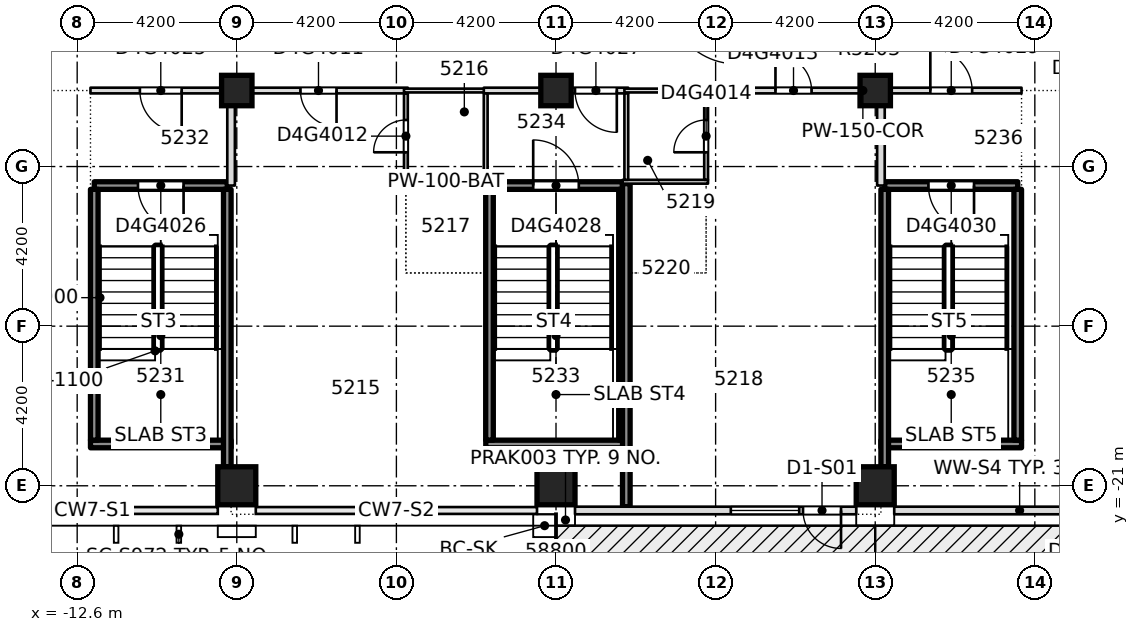
"""IFC4 building model, lengths in metres.
Left out: names, types, materials, properties, quantities, classifications, styles, units other than length and angle.
Written with IfcOpenShell. Run it as: python <this file> out.ifc"""

import sys

from ifc_helpers import new_model, si_unit, direction, frame, frame_2d, origin, origin_2d, place, context, subcontext, project, spatial, rectangle, extrude, element, fill, save


model = new_model("IFC4")
c1 = context("Model", 3, precision=1e-05, world=origin(), true_north=direction((0.0, 1.0)))
c2 = subcontext(c1, "Body", "Model", "MODEL_VIEW")
j1 = project(units=[si_unit("LENGTHUNIT", "METRE"), si_unit("PLANEANGLEUNIT", "RADIAN")], contexts=[c1])
p1 = place(None, origin())
s1 = spatial("IfcSite", under=j1, at=p1, CompositionType="ELEMENT")
p2 = place(p1, origin())
s2 = spatial("IfcBuilding", under=s1, at=p2, CompositionType="ELEMENT")
p3 = place(p2, frame((0.0, 0.0, 199.7)))
s3 = spatial("IfcBuildingStorey", under=s2, at=p3, CompositionType="ELEMENT", Elevation=199.7)
for number, where, z_axis, x_axis in (
    (1, (-8.4, -21.0, -0.4), (0.0, 0.0, 1.0), (1.0, 0.0, 0.0)),
    (2, (0.0, -21.0, -0.4), (0.0, 0.0, 1.0), (1.0, 0.0, 0.0)),
    (3, (8.4, -21.0, -0.4), (0.0, 0.0, 1.0), (1.0, 0.0, 0.0)),
):
    element("IfcColumn", number, at=place(p3, frame(where, z_axis=z_axis, x_axis=x_axis)), inside=s3, PredefinedType="COLUMN", context=c2, shape_type="SweptSolid", body=[
        extrude(rectangle(XDim=1.0, YDim=1.0, at=origin_2d()), origin(), (0.0, 0.0, 1.0), 3.45),
    ])
for number, where, z_axis, x_axis in (
    (4, (-8.4, -10.6, -0.4), (0.0, 0.0, 1.0), (1.0, 0.0, 0.0)),
    (5, (0.0, -10.6, -0.4), (0.0, 0.0, 1.0), (1.0, 0.0, 0.0)),
    (6, (8.4, -10.6, -0.4), (0.0, 0.0, 1.0), (1.0, 0.0, 0.0)),
):
    element("IfcColumn", number, at=place(p3, frame(where, z_axis=z_axis, x_axis=x_axis)), inside=s3, PredefinedType="COLUMN", context=c2, shape_type="SweptSolid", body=[
        extrude(rectangle(XDim=0.8, YDim=0.8, at=origin_2d()), origin(), (0.0, 0.0, 1.0), 3.45),
    ])
p4 = place(p3, frame((-1.848, -19.9, 0.0), z_axis=(0.0, 0.0, 1.0), x_axis=(1.0, 0.0, 0.0)))
e7 = element("IfcWall", 7, at=p4, inside=s3, PredefinedType="SOLIDWALL", context=c2, shape_type="SweptSolid", body=[
    extrude(rectangle(XDim=3.696, YDim=0.2, at=frame_2d((1.848, 0.0))), origin(), (0.0, 0.0, 1.0), 3.05),
])
p5 = place(p3, frame((-12.15, -13.1, 0.0), z_axis=(0.0, 0.0, 1.0), x_axis=(1.0, 0.0, 0.0)))
e8 = element("IfcWall", 8, at=p5, inside=s3, PredefinedType="SOLIDWALL", context=c2, shape_type="SweptSolid", body=[
    extrude(rectangle(XDim=3.5, YDim=0.2, at=frame_2d((1.75, 0.0))), origin(), (0.0, 0.0, 1.0), 3.05),
])
p6 = place(p5, frame((1.15, 0.0, 0.0)))
e9 = element("IfcOpeningElement", 9, at=p6, cuts=e8, PredefinedType="OPENING", context=c2, shape_type="SweptSolid", body=[
    extrude(rectangle(XDim=1.2, YDim=2.1, at=frame_2d((0.6, 1.05))), frame((0.0, 0.11, 0.0), z_axis=(0.0, -1.0, 0.0), x_axis=(1.0, 0.0, 0.0)), (0.0, 0.0, 1.0), 0.22),
])
p7 = place(p3, frame((-1.848, -13.1, 0.0), z_axis=(0.0, 0.0, 1.0), x_axis=(1.0, 0.0, 0.0)))
e10 = element("IfcWall", 10, at=p7, inside=s3, PredefinedType="SOLIDWALL", context=c2, shape_type="SweptSolid", body=[
    extrude(rectangle(XDim=3.596, YDim=0.2, at=frame_2d((1.798, 0.0))), origin(), (0.0, 0.0, 1.0), 3.05),
])
p8 = place(p7, frame((1.248, 0.0, 0.0)))
e11 = element("IfcOpeningElement", 11, at=p8, cuts=e10, PredefinedType="OPENING", context=c2, shape_type="SweptSolid", body=[
    extrude(rectangle(XDim=1.2, YDim=2.1, at=frame_2d((0.6, 1.05))), frame((0.0, 0.11, 0.0), z_axis=(0.0, -1.0, 0.0), x_axis=(1.0, 0.0, 0.0)), (0.0, 0.0, 1.0), 0.22),
])
p9 = place(p3, frame((8.65, -13.1, 0.0), z_axis=(0.0, 0.0, 1.0), x_axis=(1.0, 0.0, 0.0)))
e12 = element("IfcWall", 12, at=p9, inside=s3, PredefinedType="SOLIDWALL", context=c2, shape_type="SweptSolid", body=[
    extrude(rectangle(XDim=3.5, YDim=0.2, at=frame_2d((1.75, 0.0))), origin(), (0.0, 0.0, 1.0), 3.05),
])
p10 = place(p9, frame((1.15, 0.0, 0.0)))
e13 = element("IfcOpeningElement", 13, at=p10, cuts=e12, PredefinedType="OPENING", context=c2, shape_type="SweptSolid", body=[
    extrude(rectangle(XDim=1.2, YDim=2.1, at=frame_2d((0.6, 1.05))), frame((0.0, 0.11, 0.0), z_axis=(0.0, -1.0, 0.0), x_axis=(1.0, 0.0, 0.0)), (0.0, 0.0, 1.0), 0.22),
])
p11 = place(p3, frame((-4.0, -13.0, 0.0), z_axis=(0.0, 0.0, 1.0), x_axis=(1.0, 0.0, 0.0)))
e14 = element("IfcWall", 14, at=p11, inside=s3, PredefinedType="PARTITIONING", context=c2, shape_type="SweptSolid", body=[
    extrude(rectangle(XDim=2.2, YDim=0.1, at=frame_2d((1.1, 0.0))), origin(), (0.0, 0.0, 1.0), 3.05),
])
p12 = place(p3, frame((1.75, -13.0, 0.0), z_axis=(0.0, 0.0, 1.0), x_axis=(1.0, 0.0, 0.0)))
e15 = element("IfcWall", 15, at=p12, inside=s3, PredefinedType="PARTITIONING", context=c2, shape_type="SweptSolid", body=[
    extrude(rectangle(XDim=2.25, YDim=0.1, at=frame_2d((1.125, 0.0))), origin(), (0.0, 0.0, 1.0), 3.05),
])
p13 = place(p3, frame((-12.25, -10.6, 0.0), z_axis=(0.0, 0.0, 1.0), x_axis=(1.0, 0.0, 0.0)))
e16 = element("IfcWall", 16, at=p13, inside=s3, PredefinedType="PARTITIONING", context=c2, shape_type="SweptSolid", body=[
    extrude(rectangle(XDim=8.35, YDim=0.15, at=frame_2d((4.175, 0.0))), origin(), (0.0, 0.0, 1.0), 3.05),
])
p14 = place(p13, frame((5.525, 0.0, 0.0)))
e17 = element("IfcOpeningElement", 17, at=p14, cuts=e16, PredefinedType="OPENING", context=c2, shape_type="SweptSolid", body=[
    extrude(rectangle(XDim=0.95, YDim=2.1, at=frame_2d((0.475, 1.05))), frame((0.0, 0.085, 0.0), z_axis=(0.0, -1.0, 0.0), x_axis=(1.0, 0.0, 0.0)), (0.0, 0.0, 1.0), 0.17),
])
p15 = place(p13, frame((1.3, 0.0, 0.0)))
e18 = element("IfcOpeningElement", 18, at=p15, cuts=e16, PredefinedType="OPENING", context=c2, shape_type="SweptSolid", body=[
    extrude(rectangle(XDim=1.1, YDim=2.1, at=frame_2d((0.55, 1.05))), frame((0.0, 0.085, 0.0), z_axis=(0.0, -1.0, 0.0), x_axis=(1.0, 0.0, 0.0)), (0.0, 0.0, 1.0), 0.17),
])
p16 = place(p3, frame((-4.0, -10.6, 0.0), z_axis=(0.0, 0.0, 1.0), x_axis=(1.0, 0.0, 0.0)))
e19 = element("IfcWall", 19, at=p16, inside=s3, PredefinedType="PARTITIONING", context=c2, shape_type="SweptSolid", body=[
    extrude(rectangle(XDim=2.2, YDim=0.1, at=frame_2d((1.1, 0.0))), origin(), (0.0, 0.0, 1.0), 3.05),
])
p17 = place(p3, frame((-1.9, -10.6, 0.0), z_axis=(0.0, 0.0, 1.0), x_axis=(1.0, 0.0, 0.0)))
e20 = element("IfcWall", 20, at=p17, inside=s3, PredefinedType="PARTITIONING", context=c2, shape_type="SweptSolid", body=[
    extrude(rectangle(XDim=3.8, YDim=0.15, at=frame_2d((1.9, 0.0))), origin(), (0.0, 0.0, 1.0), 3.05),
])
p18 = place(p17, frame((2.4, 0.0, 0.0)))
e21 = element("IfcOpeningElement", 21, at=p18, cuts=e20, PredefinedType="OPENING", context=c2, shape_type="SweptSolid", body=[
    extrude(rectangle(XDim=1.1, YDim=2.1, at=frame_2d((0.55, 1.05))), frame((0.0, 0.085, 0.0), z_axis=(0.0, -1.0, 0.0), x_axis=(1.0, 0.0, 0.0)), (0.0, 0.0, 1.0), 0.17),
])
p19 = place(p3, frame((1.8, -10.6, 0.0), z_axis=(0.0, 0.0, 1.0), x_axis=(1.0, 0.0, 0.0)))
e22 = element("IfcWall", 22, at=p19, inside=s3, PredefinedType="PARTITIONING", context=c2, shape_type="SweptSolid", body=[
    extrude(rectangle(XDim=2.2, YDim=0.1, at=frame_2d((1.1, 0.0))), origin(), (0.0, 0.0, 1.0), 3.05),
])
p20 = place(p3, frame((3.9, -10.6, 0.0), z_axis=(0.0, 0.0, 1.0), x_axis=(1.0, 0.0, 0.0)))
e23 = element("IfcWall", 23, at=p20, inside=s3, PredefinedType="PARTITIONING", context=c2, shape_type="SweptSolid", body=[
    extrude(rectangle(XDim=8.35, YDim=0.15, at=frame_2d((4.175, 0.0))), origin(), (0.0, 0.0, 1.0), 3.05),
])
p21 = place(p20, frame((1.875, 0.0, 0.0)))
e24 = element("IfcOpeningElement", 24, at=p21, cuts=e23, PredefinedType="OPENING", context=c2, shape_type="SweptSolid", body=[
    extrude(rectangle(XDim=0.95, YDim=2.1, at=frame_2d((0.475, 1.05))), frame((0.0, 0.085, 0.0), z_axis=(0.0, -1.0, 0.0), x_axis=(1.0, 0.0, 0.0)), (0.0, 0.0, 1.0), 0.17),
])
p22 = place(p20, frame((5.95, 0.0, 0.0)))
e25 = element("IfcOpeningElement", 25, at=p22, cuts=e23, PredefinedType="OPENING", context=c2, shape_type="SweptSolid", body=[
    extrude(rectangle(XDim=1.1, YDim=2.1, at=frame_2d((0.55, 1.05))), frame((0.0, 0.085, 0.0), z_axis=(0.0, -1.0, 0.0), x_axis=(1.0, 0.0, 0.0)), (0.0, 0.0, 1.0), 0.17),
])
p23 = place(p3, frame((-8.55, -13.1, 0.0), z_axis=(0.0, 0.0, 1.0), x_axis=(0.0, 1.0, 0.0)))
e26 = element("IfcWall", 26, at=p23, inside=s3, PredefinedType="PARTITIONING", context=c2, shape_type="SweptSolid", body=[
    extrude(rectangle(XDim=2.425, YDim=0.2, at=frame_2d((1.212, 0.0))), origin(), (0.0, 0.0, 1.0), 3.05),
])
p24 = place(p3, frame((-3.95, -12.95, 0.0), z_axis=(0.0, 0.0, 1.0), x_axis=(0.0, 1.0, 0.0)))
e27 = element("IfcWall", 27, at=p24, inside=s3, PredefinedType="PARTITIONING", context=c2, shape_type="SweptSolid", body=[
    extrude(rectangle(XDim=2.275, YDim=0.1, at=frame_2d((1.137, 0.0))), origin(), (0.0, 0.0, 1.0), 3.05),
])
p25 = place(p24, frame((0.725, 0.0, 0.0)))
e28 = element("IfcOpeningElement", 28, at=p25, cuts=e27, PredefinedType="OPENING", context=c2, shape_type="SweptSolid", body=[
    extrude(rectangle(XDim=0.85, YDim=2.1, at=frame_2d((0.425, 1.05))), frame((0.0, 0.06, 0.0), z_axis=(0.0, -1.0, 0.0), x_axis=(1.0, 0.0, 0.0)), (0.0, 0.0, 1.0), 0.12),
])
p26 = place(p3, frame((-1.85, -12.95, 0.0), z_axis=(0.0, 0.0, 1.0), x_axis=(0.0, 1.0, 0.0)))
e29 = element("IfcWall", 29, at=p26, inside=s3, PredefinedType="PARTITIONING", context=c2, shape_type="SweptSolid", body=[
    extrude(rectangle(XDim=2.275, YDim=0.1, at=frame_2d((1.137, 0.0))), origin(), (0.0, 0.0, 1.0), 3.05),
])
for number, where, z_axis, x_axis in (
    (30, (-1.75, -19.798, 0.0), (0.0, 0.0, 1.0), (0.0, 1.0, 0.0)),
    (31, (1.75, -19.798, 0.0), (0.0, 0.0, 1.0), (0.0, 1.0, 0.0)),
):
    element("IfcWall", number, at=place(p3, frame(where, z_axis=z_axis, x_axis=x_axis)), inside=s3, PredefinedType="SOLIDWALL", context=c2, shape_type="SweptSolid", body=[
        extrude(rectangle(XDim=6.596, YDim=0.2, at=frame_2d((3.298, 0.0))), origin(), (0.0, 0.0, 1.0), 3.05),
    ])
p27 = place(p3, frame((1.85, -12.95, 0.0), z_axis=(0.0, 0.0, 1.0), x_axis=(0.0, 1.0, 0.0)))
e32 = element("IfcWall", 32, at=p27, inside=s3, PredefinedType="PARTITIONING", context=c2, shape_type="SweptSolid", body=[
    extrude(rectangle(XDim=2.275, YDim=0.1, at=frame_2d((1.137, 0.0))), origin(), (0.0, 0.0, 1.0), 3.05),
])
p28 = place(p3, frame((3.95, -12.95, 0.0), z_axis=(0.0, 0.0, 1.0), x_axis=(0.0, 1.0, 0.0)))
e33 = element("IfcWall", 33, at=p28, inside=s3, PredefinedType="PARTITIONING", context=c2, shape_type="SweptSolid", body=[
    extrude(rectangle(XDim=2.275, YDim=0.1, at=frame_2d((1.137, 0.0))), origin(), (0.0, 0.0, 1.0), 3.05),
])
p29 = place(p28, frame((0.725, 0.0, 0.0)))
e34 = element("IfcOpeningElement", 34, at=p29, cuts=e33, PredefinedType="OPENING", context=c2, shape_type="SweptSolid", body=[
    extrude(rectangle(XDim=0.85, YDim=2.1, at=frame_2d((0.425, 1.05))), frame((0.0, 0.06, 0.0), z_axis=(0.0, -1.0, 0.0), x_axis=(1.0, 0.0, 0.0)), (0.0, 0.0, 1.0), 0.12),
])
p30 = place(p3, frame((8.55, -13.1, 0.0), z_axis=(0.0, 0.0, 1.0), x_axis=(0.0, 1.0, 0.0)))
e35 = element("IfcWall", 35, at=p30, inside=s3, PredefinedType="PARTITIONING", context=c2, shape_type="SweptSolid", body=[
    extrude(rectangle(XDim=2.425, YDim=0.2, at=frame_2d((1.212, 0.0))), origin(), (0.0, 0.0, 1.0), 3.05),
])
p31 = place(p3, frame((0.5, -21.65, 0.0), z_axis=(0.0, 0.0, 1.0), x_axis=(1.0, 0.0, 0.0)))
e36 = element("IfcWall", 36, at=p31, inside=s3, PredefinedType="STANDARD", context=c2, shape_type="SweptSolid", body=[
    extrude(rectangle(XDim=7.4, YDim=0.2, at=frame_2d((3.7, 0.0))), origin(), (0.0, 0.0, 1.0), 3.05),
])
p32 = place(p31, frame((4.1, 0.0, 0.2)))
e37 = element("IfcOpeningElement", 37, at=p32, cuts=e36, PredefinedType="OPENING", context=c2, shape_type="SweptSolid", body=[
    extrude(rectangle(XDim=1.8, YDim=2.65, at=frame_2d((0.9, 1.325))), frame((0.0, 0.11, 0.0), z_axis=(0.0, -1.0, 0.0), x_axis=(1.0, 0.0, 0.0)), (0.0, 0.0, 1.0), 0.22),
])
p33 = place(p31, frame((6.0, 0.0, 0.0)))
e38 = element("IfcOpeningElement", 38, at=p33, cuts=e36, PredefinedType="OPENING", context=c2, shape_type="SweptSolid", body=[
    extrude(rectangle(XDim=1.0, YDim=2.4, at=frame_2d((0.5, 1.2))), frame((0.0, 0.11, 0.0), z_axis=(0.0, -1.0, 0.0), x_axis=(1.0, 0.0, 0.0)), (0.0, 0.0, 1.0), 0.22),
])
p34 = place(p3, frame((8.9, -21.65, 0.0), z_axis=(0.0, 0.0, 1.0), x_axis=(1.0, 0.0, 0.0)))
e39 = element("IfcWall", 39, at=p34, inside=s3, PredefinedType="STANDARD", context=c2, shape_type="SweptSolid", body=[
    extrude(rectangle(XDim=6.6, YDim=0.2, at=frame_2d((3.3, 0.0))), origin(), (0.0, 0.0, 1.0), 3.05),
])
p35 = place(p34, frame((4.65, 0.0, 0.0)))
e40 = element("IfcOpeningElement", 40, at=p35, cuts=e39, PredefinedType="OPENING", context=c2, shape_type="SweptSolid", body=[
    extrude(rectangle(XDim=1.0, YDim=2.4, at=frame_2d((0.5, 1.2))), frame((0.0, 0.11, 0.0), z_axis=(0.0, -1.0, 0.0), x_axis=(1.0, 0.0, 0.0)), (0.0, 0.0, 1.0), 0.22),
])
p36 = place(p3, frame((-12.25, -19.9, 0.0), z_axis=(0.0, 0.0, 1.0), x_axis=(1.0, 0.0, 0.0)))
e41 = element("IfcWall", 41, at=p36, inside=s3, PredefinedType="SOLIDWALL", context=c2, shape_type="SweptSolid", body=[
    extrude(rectangle(XDim=3.7, YDim=0.2, at=frame_2d((1.85, 0.0))), origin(), (0.0, 0.0, 1.0), 3.05),
])
p37 = place(p3, frame((-12.15, -19.8, 0.0), z_axis=(0.0, 0.0, 1.0), x_axis=(0.0, 1.0, 0.0)))
e42 = element("IfcWall", 42, at=p37, inside=s3, PredefinedType="SOLIDWALL", context=c2, shape_type="SweptSolid", body=[
    extrude(rectangle(XDim=6.6, YDim=0.2, at=frame_2d((3.3, 0.0))), origin(), (0.0, 0.0, 1.0), 3.05),
])
p38 = place(p3, frame((-8.65, -20.5, 0.0), z_axis=(0.0, 0.0, 1.0), x_axis=(0.0, 1.0, 0.0)))
e43 = element("IfcWall", 43, at=p38, inside=s3, PredefinedType="SOLIDWALL", context=c2, shape_type="SweptSolid", body=[
    extrude(rectangle(XDim=7.3, YDim=0.2, at=frame_2d((3.65, 0.0))), origin(), (0.0, 0.0, 1.0), 3.05),
])
p39 = place(p3, frame((8.55, -19.9, 0.0), z_axis=(0.0, 0.0, 1.0), x_axis=(1.0, 0.0, 0.0)))
e44 = element("IfcWall", 44, at=p39, inside=s3, PredefinedType="SOLIDWALL", context=c2, shape_type="SweptSolid", body=[
    extrude(rectangle(XDim=3.7, YDim=0.2, at=frame_2d((1.85, 0.0))), origin(), (0.0, 0.0, 1.0), 3.05),
])
p40 = place(p3, frame((8.65, -20.5, 0.0), z_axis=(0.0, 0.0, 1.0), x_axis=(0.0, 1.0, 0.0)))
e45 = element("IfcWall", 45, at=p40, inside=s3, PredefinedType="SOLIDWALL", context=c2, shape_type="SweptSolid", body=[
    extrude(rectangle(XDim=7.3, YDim=0.2, at=frame_2d((3.65, 0.0))), origin(), (0.0, 0.0, 1.0), 3.05),
])
p41 = place(p3, frame((12.15, -19.8, 0.0), z_axis=(0.0, 0.0, 1.0), x_axis=(0.0, 1.0, 0.0)))
e46 = element("IfcWall", 46, at=p41, inside=s3, PredefinedType="SOLIDWALL", context=c2, shape_type="SweptSolid", body=[
    extrude(rectangle(XDim=6.6, YDim=0.2, at=frame_2d((3.3, 0.0))), origin(), (0.0, 0.0, 1.0), 3.05),
])
p42 = place(p3, frame((1.85, -21.55, 0.0), z_axis=(0.0, 0.0, 1.0), x_axis=(0.0, 1.0, 0.0)))
e47 = element("IfcWall", 47, at=p42, inside=s3, PredefinedType="SOLIDWALL", context=c2, shape_type="SweptSolid", body=[
    extrude(rectangle(XDim=8.5, YDim=0.2, at=frame_2d((4.25, 0.0))), origin(), (0.0, 0.0, 1.0), 3.05),
])
p43 = place(p14, origin())
e48 = element("IfcDoor", 48, at=p43, inside=s3, OperationType="SINGLE_SWING_LEFT", PredefinedType="DOOR", context=c2, shape_type="SweptSolid", body=[
    extrude(rectangle(XDim=0.95, YDim=2.1, at=frame_2d((0.475, 1.05))), frame((0.0, 0.025, 0.0), z_axis=(0.0, -1.0, 0.0), x_axis=(1.0, 0.0, 0.0)), (0.0, 0.0, 1.0), 0.05),
])
fill(e17, e48)
p44 = place(p25, origin())
e49 = element("IfcDoor", 49, at=p44, inside=s3, OperationType="SINGLE_SWING_RIGHT", PredefinedType="DOOR", context=c2, shape_type="SweptSolid", body=[
    extrude(rectangle(XDim=0.85, YDim=2.1, at=frame_2d((0.425, 1.05))), frame((0.0, 0.025, 0.0), z_axis=(0.0, -1.0, 0.0), x_axis=(1.0, 0.0, 0.0)), (0.0, 0.0, 1.0), 0.05),
])
fill(e28, e49)
p45 = place(p21, origin())
e50 = element("IfcDoor", 50, at=p45, inside=s3, OperationType="SINGLE_SWING_LEFT", PredefinedType="DOOR", context=c2, shape_type="SweptSolid", body=[
    extrude(rectangle(XDim=0.95, YDim=2.1, at=frame_2d((0.475, 1.05))), frame((0.0, 0.025, 0.0), z_axis=(0.0, -1.0, 0.0), x_axis=(1.0, 0.0, 0.0)), (0.0, 0.0, 1.0), 0.05),
])
fill(e24, e50)
p46 = place(p29, origin())
e51 = element("IfcDoor", 51, at=p46, inside=s3, OperationType="SINGLE_SWING_LEFT", PredefinedType="DOOR", context=c2, shape_type="SweptSolid", body=[
    extrude(rectangle(XDim=0.85, YDim=2.1, at=frame_2d((0.425, 1.05))), frame((0.0, 0.025, 0.0), z_axis=(0.0, -1.0, 0.0), x_axis=(1.0, 0.0, 0.0)), (0.0, 0.0, 1.0), 0.05),
])
fill(e34, e51)
p47 = place(p15, origin())
e52 = element("IfcDoor", 52, at=p47, inside=s3, OperationType="SINGLE_SWING_RIGHT", PredefinedType="DOOR", context=c2, shape_type="SweptSolid", body=[
    extrude(rectangle(XDim=1.1, YDim=2.1, at=frame_2d((0.55, 1.05))), frame((0.0, 0.025, 0.0), z_axis=(0.0, -1.0, 0.0), x_axis=(1.0, 0.0, 0.0)), (0.0, 0.0, 1.0), 0.05),
])
fill(e18, e52)
p48 = place(p6, origin())
e53 = element("IfcDoor", 53, at=p48, inside=s3, OperationType="SINGLE_SWING_RIGHT", PredefinedType="DOOR", context=c2, shape_type="SweptSolid", body=[
    extrude(rectangle(XDim=1.2, YDim=2.1, at=frame_2d((0.6, 1.05))), frame((0.0, 0.025, 0.0), z_axis=(0.0, -1.0, 0.0), x_axis=(1.0, 0.0, 0.0)), (0.0, 0.0, 1.0), 0.05),
])
fill(e9, e53)
p49 = place(p18, origin())
e54 = element("IfcDoor", 54, at=p49, inside=s3, OperationType="SINGLE_SWING_LEFT", PredefinedType="DOOR", context=c2, shape_type="SweptSolid", body=[
    extrude(rectangle(XDim=1.1, YDim=2.1, at=frame_2d((0.55, 1.05))), frame((0.0, 0.025, 0.0), z_axis=(0.0, -1.0, 0.0), x_axis=(1.0, 0.0, 0.0)), (0.0, 0.0, 1.0), 0.05),
])
fill(e21, e54)
p50 = place(p8, origin())
e55 = element("IfcDoor", 55, at=p50, inside=s3, OperationType="SINGLE_SWING_RIGHT", PredefinedType="DOOR", context=c2, shape_type="SweptSolid", body=[
    extrude(rectangle(XDim=1.2, YDim=2.1, at=frame_2d((0.6, 1.05))), frame((0.0, 0.025, 0.0), z_axis=(0.0, -1.0, 0.0), x_axis=(1.0, 0.0, 0.0)), (0.0, 0.0, 1.0), 0.05),
])
fill(e11, e55)
p51 = place(p22, origin())
e56 = element("IfcDoor", 56, at=p51, inside=s3, OperationType="SINGLE_SWING_LEFT", PredefinedType="DOOR", context=c2, shape_type="SweptSolid", body=[
    extrude(rectangle(XDim=1.1, YDim=2.1, at=frame_2d((0.55, 1.05))), frame((0.0, 0.025, 0.0), z_axis=(0.0, -1.0, 0.0), x_axis=(1.0, 0.0, 0.0)), (0.0, 0.0, 1.0), 0.05),
])
fill(e25, e56)
p52 = place(p10, origin())
e57 = element("IfcDoor", 57, at=p52, inside=s3, OperationType="SINGLE_SWING_RIGHT", PredefinedType="DOOR", context=c2, shape_type="SweptSolid", body=[
    extrude(rectangle(XDim=1.2, YDim=2.1, at=frame_2d((0.6, 1.05))), frame((0.0, 0.025, 0.0), z_axis=(0.0, -1.0, 0.0), x_axis=(1.0, 0.0, 0.0)), (0.0, 0.0, 1.0), 0.05),
])
fill(e13, e57)
p53 = place(p32, origin())
e58 = element("IfcWindow", 58, at=p53, inside=s3, PartitioningType="SINGLE_PANEL", PredefinedType="WINDOW", context=c2, shape_type="SweptSolid", body=[
    extrude(rectangle(XDim=1.8, YDim=2.65, at=frame_2d((0.9, 1.325))), frame((0.0, 0.03, 0.0), z_axis=(0.0, -1.0, 0.0), x_axis=(1.0, 0.0, 0.0)), (0.0, 0.0, 1.0), 0.06),
])
fill(e37, e58)
p54 = place(p33, origin())
e59 = element("IfcDoor", 59, at=p54, inside=s3, OperationType="SINGLE_SWING_LEFT", PredefinedType="DOOR", context=c2, shape_type="SweptSolid", body=[
    extrude(rectangle(XDim=1.0, YDim=2.4, at=frame_2d((0.5, 1.2))), frame((0.0, 0.025, 0.0), z_axis=(0.0, -1.0, 0.0), x_axis=(1.0, 0.0, 0.0)), (0.0, 0.0, 1.0), 0.05),
])
fill(e38, e59)
save(model, sys.argv[1])
